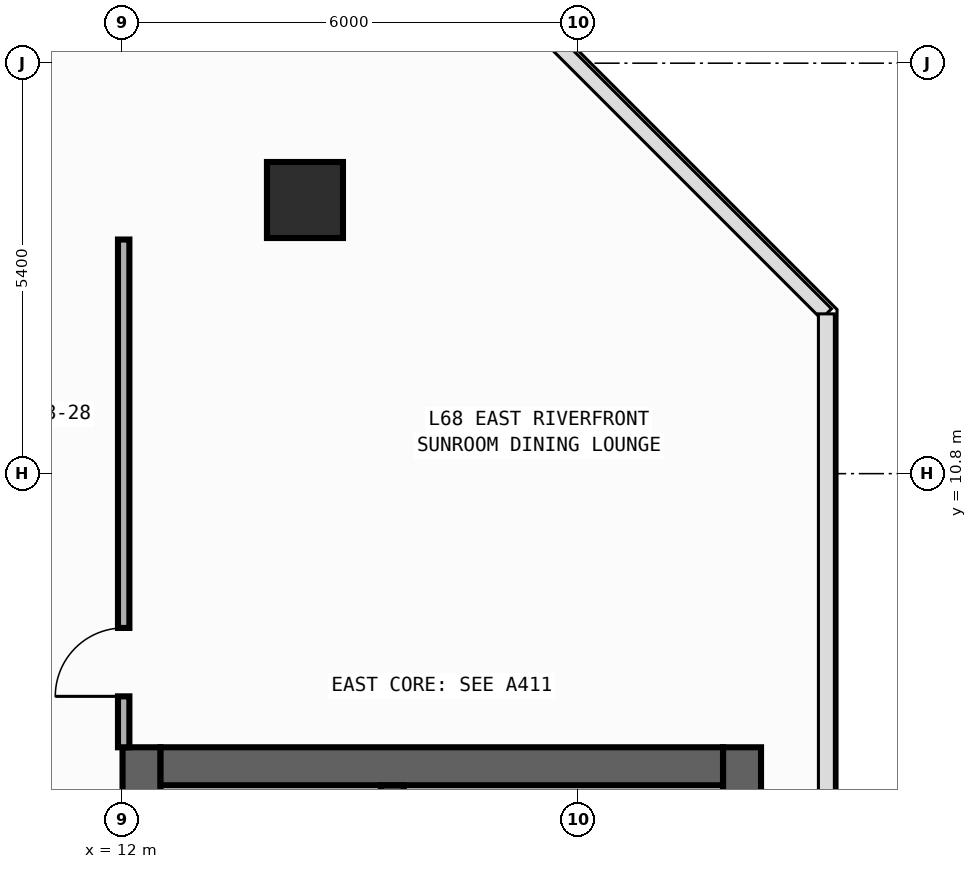
"""IFC4 building model, lengths in metres.
Left out: names, types, materials, properties, quantities, classifications, styles, units other than length and angle.
Written with IfcOpenShell. Run it as: python <this file> out.ifc"""

import sys

from ifc_helpers import new_model, si_unit, direction, frame, frame_2d, origin, origin_2d, place, context, subcontext, project, spatial, rectangle, circle, extrude, element, fill, save


model = new_model("IFC4")
c1 = context("Model", 3, precision=1e-05, world=origin(), true_north=direction((0.0, 1.0)))
c2 = subcontext(c1, "Body", "Model", "MODEL_VIEW")
j1 = project(units=[si_unit("LENGTHUNIT", "METRE"), si_unit("PLANEANGLEUNIT", "RADIAN")], contexts=[c1])
p1 = place(None, origin())
s1 = spatial("IfcSite", under=j1, at=p1, CompositionType="ELEMENT")
p2 = place(p1, origin())
s2 = spatial("IfcBuilding", under=s1, at=p2, CompositionType="ELEMENT")
p3 = place(p2, frame((0.0, 0.0, 285.2)))
s3 = spatial("IfcBuildingStorey", under=s2, at=p3, CompositionType="ELEMENT", Elevation=285.2)
p4 = place(p3, frame((12.25, -19.8, 0.0), z_axis=(0.0, 0.0, 1.0), x_axis=(0.0, 1.0, 0.0)))
e1 = element("IfcWall", 1, at=p4, inside=s3, PredefinedType="SHEAR", context=c2, shape_type="SweptSolid", body=[
    extrude(rectangle(XDim=27.0, YDim=0.5, at=frame_2d((13.5, 0.0))), origin(), (0.0, 0.0, 1.0), 3.54),
])
p5 = place(p4, frame((23.05, 0.0, 0.0)))
e2 = element("IfcOpeningElement", 2, at=p5, cuts=e1, PredefinedType="OPENING", context=c2, shape_type="SweptSolid", body=[
    extrude(rectangle(XDim=1.1, YDim=2.2, at=frame_2d((0.55, 1.1))), frame((0.0, 0.26, 0.0), z_axis=(0.0, -1.0, 0.0), x_axis=(1.0, 0.0, 0.0)), (0.0, 0.0, 1.0), 0.52),
])
p6 = place(p4, frame((19.85, 0.0, 0.0)))
e3 = element("IfcOpeningElement", 3, at=p6, cuts=e1, PredefinedType="OPENING", context=c2, shape_type="SweptSolid", body=[
    extrude(rectangle(XDim=1.1, YDim=2.2, at=frame_2d((0.55, 1.1))), frame((0.0, 0.26, 0.0), z_axis=(0.0, -1.0, 0.0), x_axis=(1.0, 0.0, 0.0)), (0.0, 0.0, 1.0), 0.52),
])
p7 = place(p4, frame((16.65, 0.0, 0.0)))
e4 = element("IfcOpeningElement", 4, at=p7, cuts=e1, PredefinedType="OPENING", context=c2, shape_type="SweptSolid", body=[
    extrude(rectangle(XDim=1.1, YDim=2.2, at=frame_2d((0.55, 1.1))), frame((0.0, 0.26, 0.0), z_axis=(0.0, -1.0, 0.0), x_axis=(1.0, 0.0, 0.0)), (0.0, 0.0, 1.0), 0.52),
])
p8 = place(p4, frame((7.175, 0.0, 0.0)))
e5 = element("IfcOpeningElement", 5, at=p8, cuts=e1, PredefinedType="OPENING", context=c2, shape_type="SweptSolid", body=[
    extrude(rectangle(XDim=0.85, YDim=2.1, at=frame_2d((0.425, 1.05))), frame((0.0, 0.26, 0.0), z_axis=(0.0, -1.0, 0.0), x_axis=(1.0, 0.0, 0.0)), (0.0, 0.0, 1.0), 0.52),
])
p9 = place(p4, frame((10.375, 0.0, 0.0)))
e6 = element("IfcOpeningElement", 6, at=p9, cuts=e1, PredefinedType="OPENING", context=c2, shape_type="SweptSolid", body=[
    extrude(rectangle(XDim=0.85, YDim=2.1, at=frame_2d((0.425, 1.05))), frame((0.0, 0.26, 0.0), z_axis=(0.0, -1.0, 0.0), x_axis=(1.0, 0.0, 0.0)), (0.0, 0.0, 1.0), 0.52),
])
p10 = place(p4, frame((12.725, 0.0, 0.0)))
e7 = element("IfcOpeningElement", 7, at=p10, cuts=e1, PredefinedType="OPENING", context=c2, shape_type="SweptSolid", body=[
    extrude(rectangle(XDim=1.15, YDim=2.2, at=frame_2d((0.575, 1.1))), frame((0.0, 0.26, 0.0), z_axis=(0.0, -1.0, 0.0), x_axis=(1.0, 0.0, 0.0)), (0.0, 0.0, 1.0), 0.52),
])
p11 = place(p4, frame((25.125, 0.0, 0.0)))
e8 = element("IfcOpeningElement", 8, at=p11, cuts=e1, PredefinedType="OPENING", context=c2, shape_type="SweptSolid", body=[
    extrude(rectangle(XDim=0.85, YDim=2.1, at=frame_2d((0.425, 1.05))), frame((0.0, 0.26, 0.0), z_axis=(0.0, -1.0, 0.0), x_axis=(1.0, 0.0, 0.0)), (0.0, 0.0, 1.0), 0.52),
])
p12 = place(p3, frame((20.15, -19.8, 0.0), z_axis=(0.0, 0.0, 1.0), x_axis=(0.0, 1.0, 0.0)))
e9 = element("IfcWall", 9, at=p12, inside=s3, PredefinedType="SHEAR", context=c2, shape_type="SweptSolid", body=[
    extrude(rectangle(XDim=27.0, YDim=0.5, at=frame_2d((13.5, 0.0))), origin(), (0.0, 0.0, 1.0), 3.54),
])
p13 = place(p3, frame((12.5, 6.95, 0.0), z_axis=(0.0, 0.0, 1.0), x_axis=(1.0, 0.0, 0.0)))
e10 = element("IfcWall", 10, at=p13, inside=s3, PredefinedType="SHEAR", context=c2, shape_type="SweptSolid", body=[
    extrude(rectangle(XDim=7.4, YDim=0.5, at=frame_2d((3.7, 0.0))), origin(), (0.0, 0.0, 1.0), 3.54),
])
p14 = place(p3, frame((15.55, -19.3, 0.0), z_axis=(0.0, 0.0, 1.0), x_axis=(0.0, 1.0, 0.0)))
e11 = element("IfcWall", 11, at=p14, inside=s3, PredefinedType="SHEAR", context=c2, shape_type="SweptSolid", body=[
    extrude(rectangle(XDim=26.0, YDim=0.3, at=frame_2d((13.0, 0.0))), origin(), (0.0, 0.0, 1.0), 3.54),
])
p15 = place(p14, frame((12.225, 0.0, 0.0)))
e12 = element("IfcOpeningElement", 12, at=p15, cuts=e11, PredefinedType="OPENING", context=c2, shape_type="SweptSolid", body=[
    extrude(rectangle(XDim=1.15, YDim=2.2, at=frame_2d((0.575, 1.1))), frame((0.0, 0.16, 0.0), z_axis=(0.0, -1.0, 0.0), x_axis=(1.0, 0.0, 0.0)), (0.0, 0.0, 1.0), 0.32),
])
p16 = place(p14, frame((24.625, 0.0, 0.0)))
e13 = element("IfcOpeningElement", 13, at=p16, cuts=e11, PredefinedType="OPENING", context=c2, shape_type="SweptSolid", body=[
    extrude(rectangle(XDim=0.85, YDim=2.1, at=frame_2d((0.425, 1.05))), frame((0.0, 0.16, 0.0), z_axis=(0.0, -1.0, 0.0), x_axis=(1.0, 0.0, 0.0)), (0.0, 0.0, 1.0), 0.32),
])
p17 = place(p3, frame((14.4, 14.4, 0.0), z_axis=(0.0, 0.0, 1.0), x_axis=(1.0, 0.0, 0.0)))
e14 = element("IfcColumn", 14, at=p17, inside=s3, PredefinedType="COLUMN", context=c2, shape_type="SweptSolid", body=[
    extrude(circle(Radius=0.5, at=origin_2d()), origin(), (0.0, 0.0, 1.0), 3.8),
])
p18 = place(p3, frame((12.015, 7.2, 0.0), z_axis=(0.0, 0.0, 1.0), x_axis=(0.0, 1.0, 0.0)))
e15 = element("IfcWall", 15, at=p18, inside=s3, PredefinedType="PARTITIONING", context=c2, shape_type="SweptSolid", body=[
    extrude(rectangle(XDim=6.68, YDim=0.15, at=frame_2d((3.34, 0.0))), origin(), (0.0, 0.0, 1.0), 3.54),
])
p19 = place(p18, frame((0.67, 0.0, 0.0)))
e16 = element("IfcOpeningElement", 16, at=p19, cuts=e15, PredefinedType="OPENING", context=c2, shape_type="SweptSolid", body=[
    extrude(rectangle(XDim=0.9, YDim=2.15, at=frame_2d((0.45, 1.075))), frame((0.0, 0.085, 0.0), z_axis=(0.0, -1.0, 0.0), x_axis=(1.0, 0.0, 0.0)), (0.0, 0.0, 1.0), 0.17),
])
p20 = place(p19, origin())
e17 = element("IfcDoor", 17, at=p20, inside=s3, OperationType="SINGLE_SWING_LEFT", PredefinedType="DOOR", context=c2, shape_type="SweptSolid", body=[
    extrude(rectangle(XDim=0.9, YDim=2.15, at=frame_2d((0.45, 1.075))), frame((0.0, 0.025, 0.0), z_axis=(0.0, -1.0, 0.0), x_axis=(1.0, 0.0, 0.0)), (0.0, 0.0, 1.0), 0.05),
])
fill(e16, e17)
save(model, sys.argv[1])
